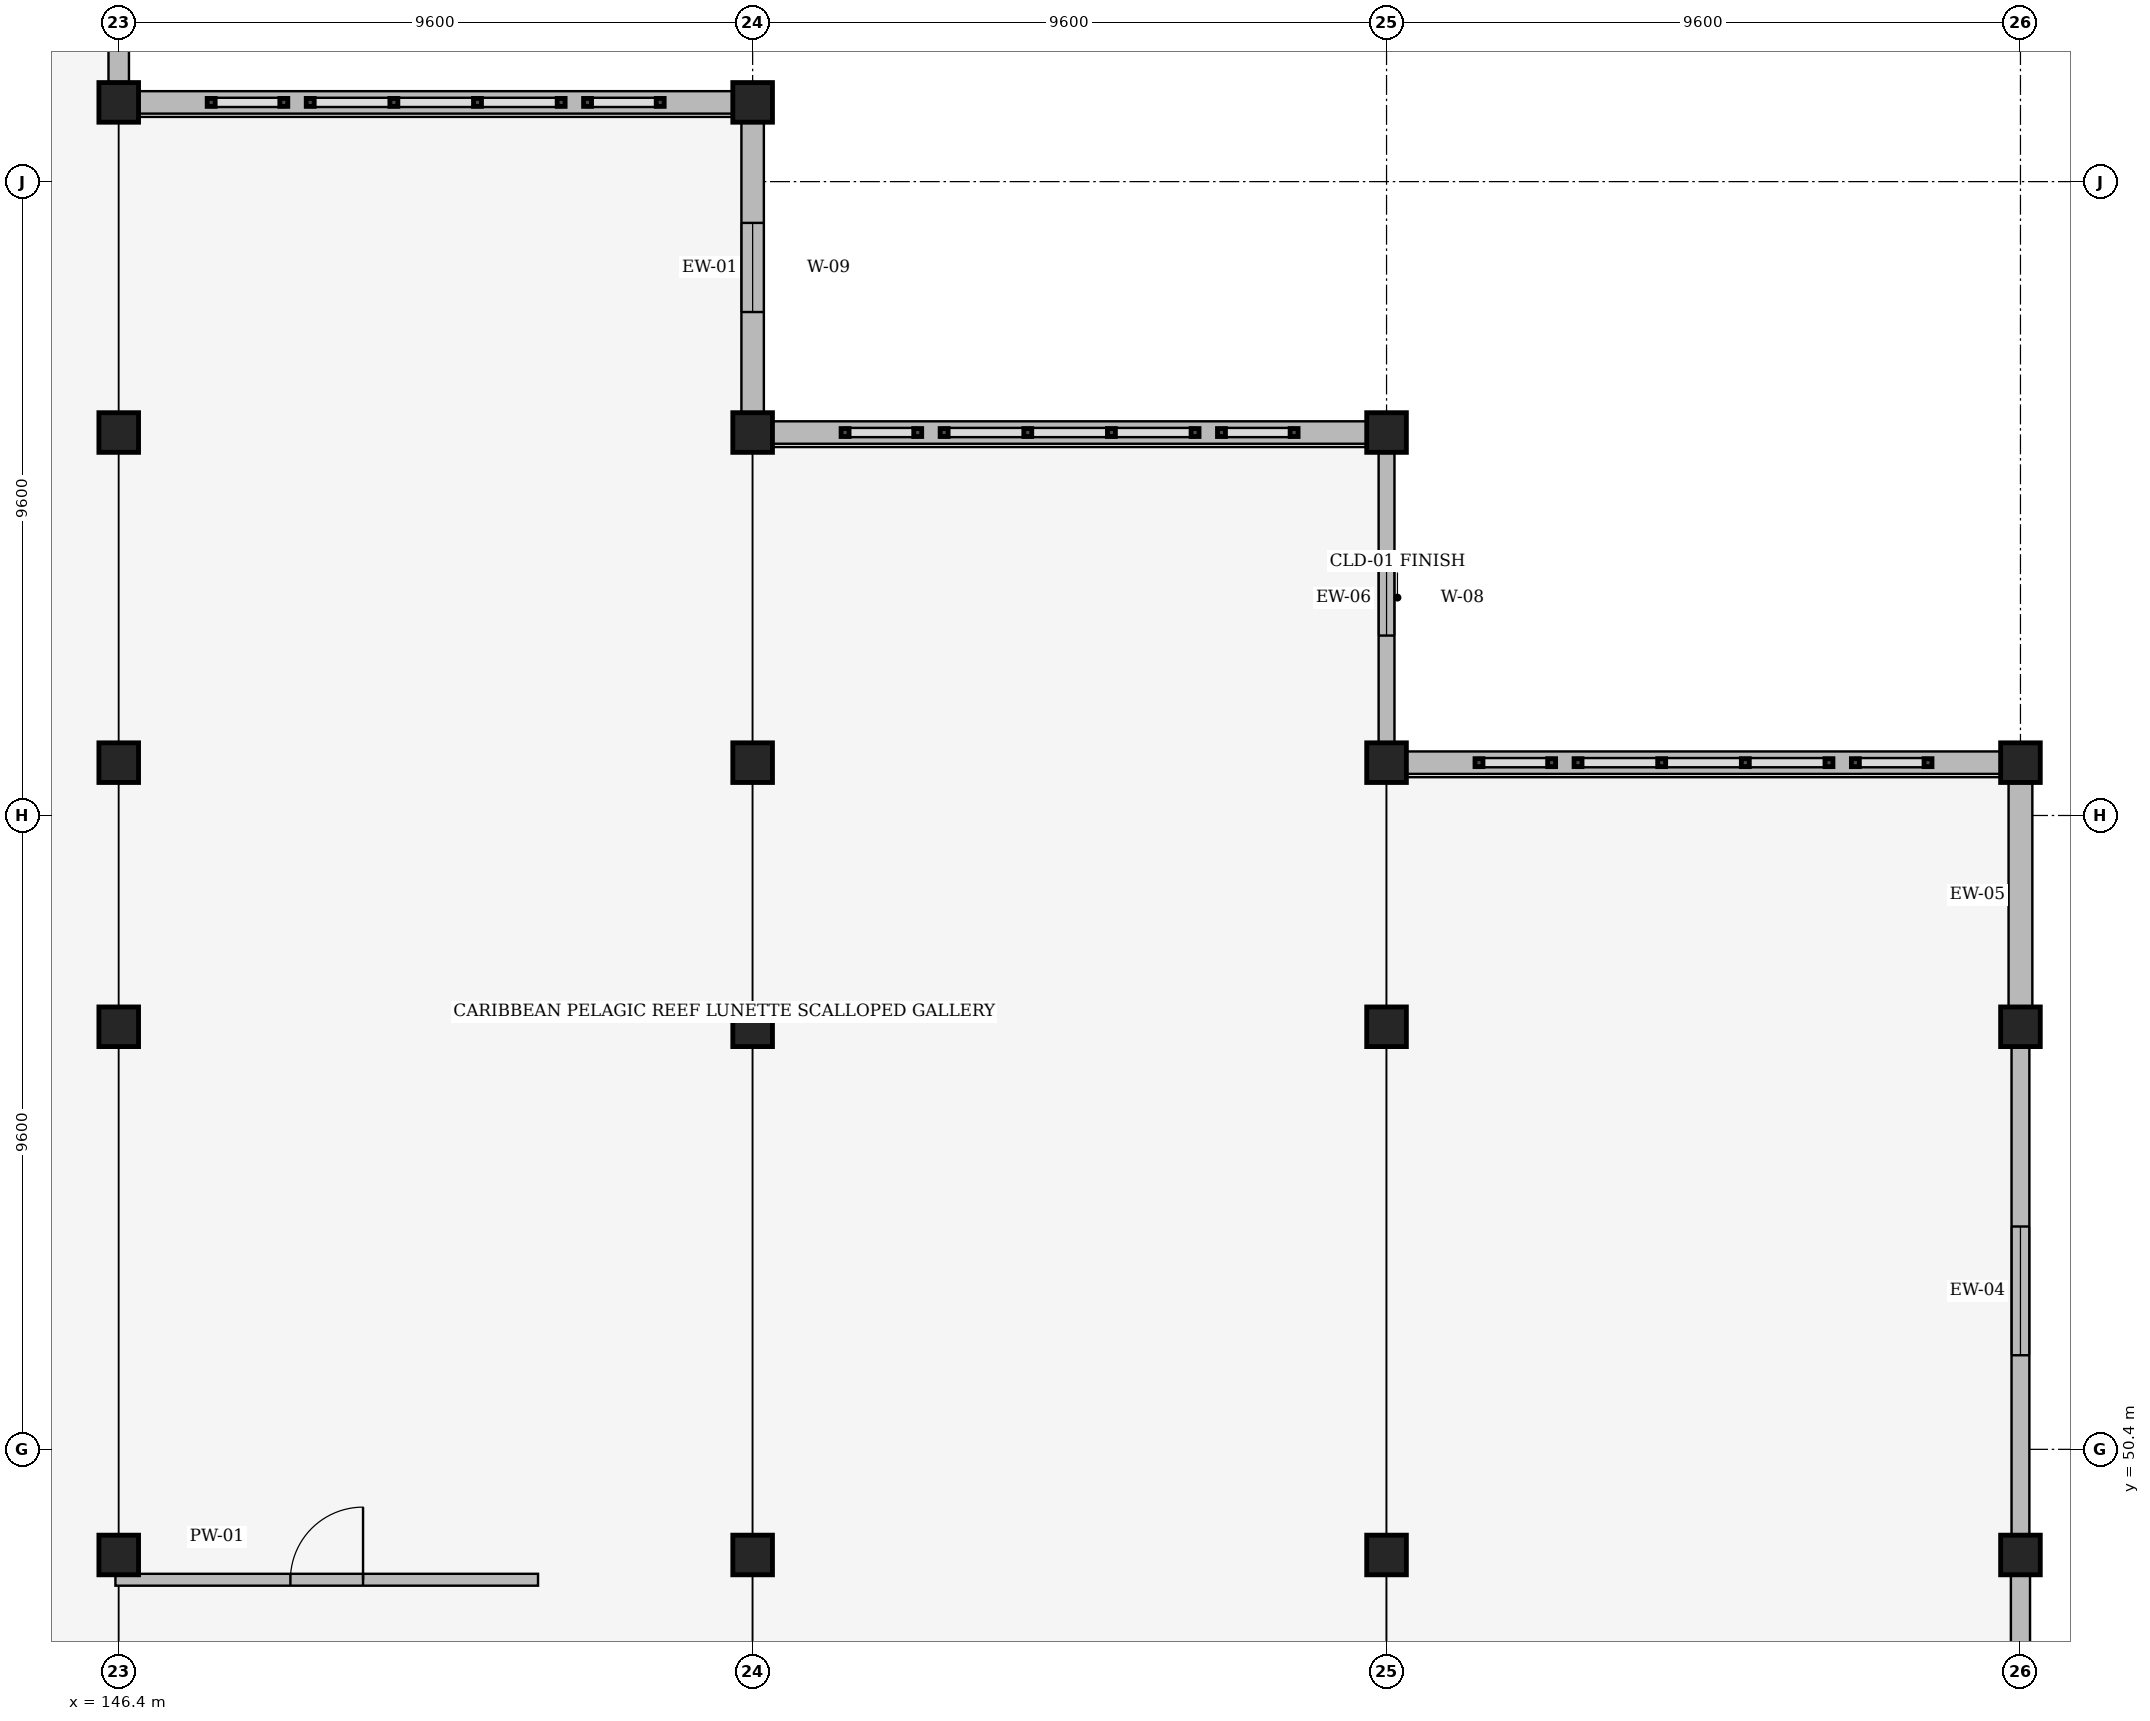
"""IFC4 building model, lengths in metres.
Left out: names, types, materials, properties, quantities, classifications, styles, units other than length and angle.
Written with IfcOpenShell. Run it as: python <this file> out.ifc"""

import sys

from ifc_helpers import new_model, si_unit, direction, frame, frame_2d, origin, origin_2d, place, context, subcontext, project, spatial, rectangle, extrude, element, fill, save


model = new_model("IFC4")
c1 = context("Model", 3, precision=1e-05, world=origin(), true_north=direction((0.0, 1.0)))
c2 = subcontext(c1, "Body", "Model", "MODEL_VIEW")
j1 = project(units=[si_unit("LENGTHUNIT", "METRE"), si_unit("PLANEANGLEUNIT", "RADIAN")], contexts=[c1])
p1 = place(None, origin())
s1 = spatial("IfcSite", under=j1, at=p1, CompositionType="ELEMENT")
p2 = place(p1, origin())
s2 = spatial("IfcBuilding", under=s1, at=p2, CompositionType="ELEMENT")
p3 = place(p2, frame((0.0, 0.0, 15.3)))
s3 = spatial("IfcBuildingStorey", under=s2, at=p3, CompositionType="ELEMENT", Elevation=15.3)
for number, where, z_axis, x_axis in (
    (1, (146.4, 48.8, 0.0), (0.0, 0.0, 1.0), (1.0, 0.0, 0.0)),
    (2, (146.4, 56.8, 0.0), (0.0, 0.0, 1.0), (1.0, 0.0, 0.0)),
    (3, (146.4, 60.8, 0.0), (0.0, 0.0, 1.0), (1.0, 0.0, 0.0)),
    (4, (146.4, 65.8, 0.0), (0.0, 0.0, 1.0), (1.0, 0.0, 0.0)),
    (5, (146.4, 70.8, 0.0), (0.0, 0.0, 1.0), (1.0, 0.0, 0.0)),
    (6, (156.0, 48.8, 0.0), (0.0, 0.0, 1.0), (1.0, 0.0, 0.0)),
    (7, (156.0, 56.8, 0.0), (0.0, 0.0, 1.0), (1.0, 0.0, 0.0)),
    (8, (156.0, 60.8, 0.0), (0.0, 0.0, 1.0), (1.0, 0.0, 0.0)),
    (9, (156.0, 65.8, 0.0), (0.0, 0.0, 1.0), (1.0, 0.0, 0.0)),
    (10, (156.0, 70.8, 0.0), (0.0, 0.0, 1.0), (1.0, 0.0, 0.0)),
    (11, (165.6, 48.8, 0.0), (0.0, 0.0, 1.0), (1.0, 0.0, 0.0)),
    (12, (165.6, 56.8, 0.0), (0.0, 0.0, 1.0), (1.0, 0.0, 0.0)),
    (13, (165.6, 60.8, 0.0), (0.0, 0.0, 1.0), (1.0, 0.0, 0.0)),
    (14, (165.6, 65.8, 0.0), (0.0, 0.0, 1.0), (1.0, 0.0, 0.0)),
    (15, (175.2, 48.8, 0.0), (0.0, 0.0, 1.0), (1.0, 0.0, 0.0)),
    (16, (175.2, 56.8, 0.0), (0.0, 0.0, 1.0), (1.0, 0.0, 0.0)),
    (17, (175.2, 60.8, 0.0), (0.0, 0.0, 1.0), (1.0, 0.0, 0.0)),
):
    element("IfcColumn", number, at=place(p3, frame(where, z_axis=z_axis, x_axis=x_axis)), inside=s3, PredefinedType="COLUMN", context=c2, shape_type="SweptSolid", body=[
        extrude(rectangle(XDim=0.6, YDim=0.6, at=origin_2d()), origin(), (0.0, 0.0, 1.0), 4.5),
    ])
p4 = place(p3, frame((165.6, 61.108, 0.0), z_axis=(0.0, 0.0, 1.0), x_axis=(0.0, 1.0, 0.0)))
e18 = element("IfcWall", 18, at=p4, inside=s3, PredefinedType="SOLIDWALL", context=c2, shape_type="SweptSolid", body=[
    extrude(rectangle(XDim=4.384, YDim=0.24, at=frame_2d((2.192, 0.0))), origin(), (0.0, 0.0, 1.0), 4.16),
])
p5 = place(p4, frame((1.617, 0.0, 0.95)))
e19 = element("IfcOpeningElement", 19, at=p5, cuts=e18, PredefinedType="OPENING", context=c2, shape_type="SweptSolid", body=[
    extrude(rectangle(XDim=1.15, YDim=2.1, at=frame_2d((0.575, 1.05))), frame((0.0, 0.13, 0.0), z_axis=(0.0, -1.0, 0.0), x_axis=(1.0, 0.0, 0.0)), (0.0, 0.0, 1.0), 0.26),
])
p6 = place(p3, frame((156.0, 66.108, 0.0), z_axis=(0.0, 0.0, 1.0), x_axis=(0.0, 1.0, 0.0)))
e20 = element("IfcWall", 20, at=p6, inside=s3, PredefinedType="SOLIDWALL", context=c2, shape_type="SweptSolid", body=[
    extrude(rectangle(XDim=4.384, YDim=0.34, at=frame_2d((2.192, 0.0))), origin(), (0.0, 0.0, 1.0), 4.16),
])
p7 = place(p6, frame((1.517, 0.0, 0.95)))
e21 = element("IfcOpeningElement", 21, at=p7, cuts=e20, PredefinedType="OPENING", context=c2, shape_type="SweptSolid", body=[
    extrude(rectangle(XDim=1.35, YDim=1.2, at=frame_2d((0.675, 0.6))), frame((0.0, 0.18, 0.0), z_axis=(0.0, -1.0, 0.0), x_axis=(1.0, 0.0, 0.0)), (0.0, 0.0, 1.0), 0.36),
])
p8 = place(p3, frame((146.4, 71.108, 0.0), z_axis=(0.0, 0.0, 1.0), x_axis=(0.0, 1.0, 0.0)))
e22 = element("IfcWall", 22, at=p8, inside=s3, PredefinedType="SOLIDWALL", context=c2, shape_type="SweptSolid", body=[
    extrude(rectangle(XDim=4.384, YDim=0.31, at=frame_2d((2.192, 0.0))), origin(), (0.0, 0.0, 1.0), 4.16),
])
p9 = place(p8, frame((1.517, 0.0, 0.95)))
e23 = element("IfcOpeningElement", 23, at=p9, cuts=e22, PredefinedType="OPENING", context=c2, shape_type="SweptSolid", body=[
    extrude(rectangle(XDim=1.35, YDim=1.5, at=frame_2d((0.675, 0.75))), frame((0.0, 0.165, 0.0), z_axis=(0.0, -1.0, 0.0), x_axis=(1.0, 0.0, 0.0)), (0.0, 0.0, 1.0), 0.33),
])
p10 = place(p3, frame((175.2, 41.108, 0.0), z_axis=(0.0, 0.0, 1.0), x_axis=(0.0, 1.0, 0.0)))
e24 = element("IfcWall", 24, at=p10, inside=s3, PredefinedType="SOLIDWALL", context=c2, shape_type="SweptSolid", body=[
    extrude(rectangle(XDim=7.384, YDim=0.29, at=frame_2d((3.692, 0.0))), origin(), (0.0, 0.0, 1.0), 4.16),
])
p11 = place(p10, frame((2.717, 0.0, 0.95)))
e25 = element("IfcOpeningElement", 25, at=p11, cuts=e24, PredefinedType="OPENING", context=c2, shape_type="SweptSolid", body=[
    extrude(rectangle(XDim=1.95, YDim=1.8, at=frame_2d((0.975, 0.9))), frame((0.0, 0.155, 0.0), z_axis=(0.0, -1.0, 0.0), x_axis=(1.0, 0.0, 0.0)), (0.0, 0.0, 1.0), 0.31),
])
p12 = place(p3, frame((175.2, 49.108, 0.0), z_axis=(0.0, 0.0, 1.0), x_axis=(0.0, 1.0, 0.0)))
e26 = element("IfcWall", 26, at=p12, inside=s3, PredefinedType="SOLIDWALL", context=c2, shape_type="SweptSolid", body=[
    extrude(rectangle(XDim=7.384, YDim=0.27, at=frame_2d((3.692, 0.0))), origin(), (0.0, 0.0, 1.0), 4.16),
])
p13 = place(p12, frame((2.717, 0.0, 0.95)))
e27 = element("IfcOpeningElement", 27, at=p13, cuts=e26, PredefinedType="OPENING", context=c2, shape_type="SweptSolid", body=[
    extrude(rectangle(XDim=1.95, YDim=2.1, at=frame_2d((0.975, 1.05))), frame((0.0, 0.145, 0.0), z_axis=(0.0, -1.0, 0.0), x_axis=(1.0, 0.0, 0.0)), (0.0, 0.0, 1.0), 0.29),
])
p14 = place(p3, frame((175.2, 57.108, 0.0), z_axis=(0.0, 0.0, 1.0), x_axis=(0.0, 1.0, 0.0)))
e28 = element("IfcWall", 28, at=p14, inside=s3, PredefinedType="SOLIDWALL", context=c2, shape_type="SweptSolid", body=[
    extrude(rectangle(XDim=3.384, YDim=0.36, at=frame_2d((1.692, 0.0))), origin(), (0.0, 0.0, 1.0), 4.16),
])
for number, where, z_axis, x_axis in (
    (29, (146.7, 70.8, 0.0), (0.0, 0.0, 1.0), (1.0, 0.0, 0.0)),
    (30, (156.3, 65.8, 0.0), (0.0, 0.0, 1.0), (1.0, 0.0, 0.0)),
    (31, (165.9, 60.8, 0.0), (0.0, 0.0, 1.0), (1.0, 0.0, 0.0)),
):
    element("IfcWall", number, at=place(p3, frame(where, z_axis=z_axis, x_axis=x_axis)), inside=s3, PredefinedType="SOLIDWALL", context=c2, shape_type="SweptSolid", body=[
        extrude(rectangle(XDim=9.0, YDim=0.34, at=frame_2d((4.5, 0.0))), origin(), (0.0, 0.0, 1.0), 1.12),
    ])
p15 = place(p3, frame((146.35, 48.425, 0.0), z_axis=(0.0, 0.0, 1.0), x_axis=(1.0, 0.0, 0.0)))
e32 = element("IfcWall", 32, at=p15, inside=s3, PredefinedType="PARTITIONING", context=c2, shape_type="SweptSolid", body=[
    extrude(rectangle(XDim=6.4, YDim=0.18, at=frame_2d((3.2, 0.0))), origin(), (0.0, 0.0, 1.0), 4.14),
])
p16 = place(p15, frame((2.65, 0.0, 0.0)))
e33 = element("IfcOpeningElement", 33, at=p16, cuts=e32, PredefinedType="OPENING", context=c2, shape_type="SweptSolid", body=[
    extrude(rectangle(XDim=1.1, YDim=2.2, at=frame_2d((0.55, 1.1))), frame((0.0, 0.1, 0.0), z_axis=(0.0, -1.0, 0.0), x_axis=(1.0, 0.0, 0.0)), (0.0, 0.0, 1.0), 0.2),
])
p17 = place(p5, origin())
e34 = element("IfcWindow", 34, at=p17, inside=s3, PartitioningType="SINGLE_PANEL", PredefinedType="WINDOW", context=c2, shape_type="SweptSolid", body=[
    extrude(rectangle(XDim=1.15, YDim=2.1, at=frame_2d((0.575, 1.05))), frame((0.0, 0.03, 0.0), z_axis=(0.0, -1.0, 0.0), x_axis=(1.0, 0.0, 0.0)), (0.0, 0.0, 1.0), 0.06),
])
fill(e19, e34)
p18 = place(p7, origin())
e35 = element("IfcWindow", 35, at=p18, inside=s3, PartitioningType="SINGLE_PANEL", PredefinedType="WINDOW", context=c2, shape_type="SweptSolid", body=[
    extrude(rectangle(XDim=1.35, YDim=1.2, at=frame_2d((0.675, 0.6))), frame((0.0, 0.03, 0.0), z_axis=(0.0, -1.0, 0.0), x_axis=(1.0, 0.0, 0.0)), (0.0, 0.0, 1.0), 0.06),
])
fill(e21, e35)
p19 = place(p13, origin())
e36 = element("IfcWindow", 36, at=p19, inside=s3, PartitioningType="SINGLE_PANEL", PredefinedType="WINDOW", context=c2, shape_type="SweptSolid", body=[
    extrude(rectangle(XDim=1.95, YDim=2.1, at=frame_2d((0.975, 1.05))), frame((0.0, 0.03, 0.0), z_axis=(0.0, -1.0, 0.0), x_axis=(1.0, 0.0, 0.0)), (0.0, 0.0, 1.0), 0.06),
])
fill(e27, e36)
p20 = place(p16, origin())
e37 = element("IfcDoor", 37, at=p20, inside=s3, OperationType="SINGLE_SWING_RIGHT", PredefinedType="DOOR", context=c2, shape_type="SweptSolid", body=[
    extrude(rectangle(XDim=1.1, YDim=2.2, at=frame_2d((0.55, 1.1))), frame((0.0, 0.025, 0.0), z_axis=(0.0, -1.0, 0.0), x_axis=(1.0, 0.0, 0.0)), (0.0, 0.0, 1.0), 0.05),
])
fill(e33, e37)
save(model, sys.argv[1])
